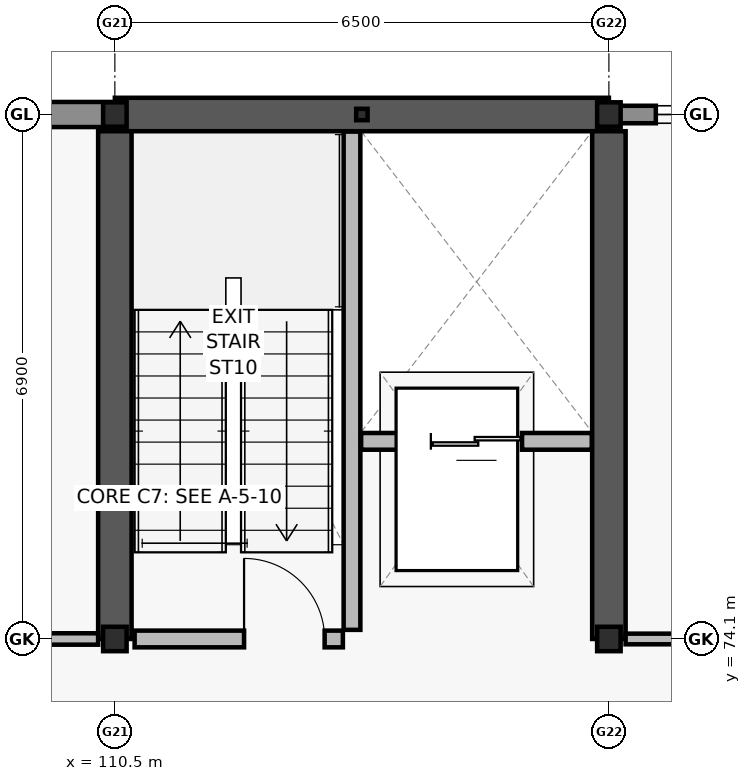
"""IFC4 building model, lengths in metres.
Left out: names, types, materials, properties, quantities, classifications, styles, units other than length and angle.
Written with IfcOpenShell. Run it as: python <this file> out.ifc"""

import sys

from ifc_helpers import new_model, si_unit, direction, frame, frame_2d, origin, origin_2d, place, context, subcontext, project, spatial, rectangle, hollow_rectangle, i_section, extrude, element, fill, save


model = new_model("IFC4")
c1 = context("Model", 3, precision=1e-05, world=origin(), true_north=direction((0.0, 1.0)))
c2 = subcontext(c1, "Body", "Model", "MODEL_VIEW")
j1 = project(units=[si_unit("LENGTHUNIT", "METRE"), si_unit("PLANEANGLEUNIT", "RADIAN")], contexts=[c1])
p1 = place(None, origin())
s1 = spatial("IfcSite", under=j1, at=p1, CompositionType="ELEMENT")
p2 = place(p1, origin())
s2 = spatial("IfcBuilding", under=s1, at=p2, CompositionType="ELEMENT")
p3 = place(p2, frame((0.0, 0.0, 5.4)))
s3 = spatial("IfcBuildingStorey", under=s2, at=p3, CompositionType="ELEMENT", Elevation=5.4)
for number, where, z_axis, x_axis in (
    (1, (110.5, 74.1, 0.0), (0.0, 0.0, 1.0), (1.0, 0.0, 0.0)),
    (2, (110.5, 81.0, 0.0), (0.0, 0.0, 1.0), (1.0, 0.0, 0.0)),
    (3, (117.0, 74.1, 0.0), (0.0, 0.0, 1.0), (1.0, 0.0, 0.0)),
    (4, (117.0, 81.0, 0.0), (0.0, 0.0, 1.0), (1.0, 0.0, 0.0)),
):
    element("IfcColumn", number, at=place(p3, frame(where, z_axis=z_axis, x_axis=x_axis)), inside=s3, PredefinedType="COLUMN", context=c2, shape_type="SweptSolid", body=[
        extrude(i_section(OverallWidth=0.309, OverallDepth=0.321, WebThickness=0.014, FlangeThickness=0.022, FilletRadius=0.017, at=origin_2d()), origin(), (0.0, 0.0, 1.0), 4.2),
    ])
p4 = place(p3, frame((113.75, 81.0, 0.0), z_axis=(0.0, 0.0, 1.0), x_axis=(1.0, 0.0, 0.0)))
e5 = element("IfcColumn", 5, at=p4, inside=s3, PredefinedType="PILASTER", context=c2, shape_type="SweptSolid", body=[
    extrude(hollow_rectangle(XDim=0.15, YDim=0.15, WallThickness=0.009, at=origin_2d()), origin(), (0.0, 0.0, 1.0), 4.2),
])
p5 = place(p3, frame((110.5, 81.0, 0.0), z_axis=(0.0, 0.0, 1.0), x_axis=(1.0, 0.0, 0.0)))
e6 = element("IfcWall", 6, at=p5, inside=s3, PredefinedType="SHEAR", context=c2, shape_type="SweptSolid", body=[
    extrude(rectangle(XDim=6.5, YDim=0.44, at=frame_2d((3.25, 0.0))), origin(), (0.0, 0.0, 1.0), 3.96),
])
for number, where, z_axis, x_axis in (
    (7, (110.5, 74.1, 0.0), (0.0, 0.0, 1.0), (0.0, 1.0, 0.0)),
    (8, (117.0, 74.1, 0.0), (0.0, 0.0, 1.0), (0.0, 1.0, 0.0)),
):
    element("IfcWall", number, at=place(p3, frame(where, z_axis=z_axis, x_axis=x_axis)), inside=s3, PredefinedType="SHEAR", context=c2, shape_type="SweptSolid", body=[
        extrude(rectangle(XDim=6.68, YDim=0.44, at=frame_2d((3.34, 0.0))), origin(), (0.0, 0.0, 1.0), 3.96),
    ])
p6 = place(p3, frame((104.005, 81.0, 0.0), z_axis=(0.0, 0.0, 1.0), x_axis=(1.0, 0.0, 0.0)))
e9 = element("IfcWall", 9, at=p6, inside=s3, PredefinedType="SOLIDWALL", context=c2, shape_type="SweptSolid", body=[
    extrude(rectangle(XDim=6.49, YDim=0.33, at=frame_2d((3.245, 0.0))), origin(), (0.0, 0.0, 1.0), 3.32),
])
p7 = place(p6, frame((0.688, 0.0, 0.8)))
e10 = element("IfcOpeningElement", 10, at=p7, cuts=e9, PredefinedType="OPENING", context=c2, shape_type="SweptSolid", body=[
    extrude(rectangle(XDim=1.9, YDim=1.8, at=frame_2d((0.95, 0.9))), frame((0.0, 0.175, 0.0), z_axis=(0.0, -1.0, 0.0), x_axis=(1.0, 0.0, 0.0)), (0.0, 0.0, 1.0), 0.35),
])
p8 = place(p3, frame((117.005, 81.0, 0.0), z_axis=(0.0, 0.0, 1.0), x_axis=(1.0, 0.0, 0.0)))
e11 = element("IfcWall", 11, at=p8, inside=s3, PredefinedType="SOLIDWALL", context=c2, shape_type="SweptSolid", body=[
    extrude(rectangle(XDim=6.49, YDim=0.23, at=frame_2d((3.245, 0.0))), origin(), (0.0, 0.0, 1.0), 3.32),
])
p9 = place(p8, frame((0.613, 0.0, 0.8)))
e12 = element("IfcOpeningElement", 12, at=p9, cuts=e11, PredefinedType="OPENING", context=c2, shape_type="SweptSolid", body=[
    extrude(rectangle(XDim=2.05, YDim=1.8, at=frame_2d((1.025, 0.9))), frame((0.0, 0.125, 0.0), z_axis=(0.0, -1.0, 0.0), x_axis=(1.0, 0.0, 0.0)), (0.0, 0.0, 1.0), 0.25),
])
p10 = place(p3, frame((113.62, 74.22, 0.0), z_axis=(0.0, 0.0, 1.0), x_axis=(0.0, 1.0, 0.0)))
e13 = element("IfcWall", 13, at=p10, inside=s3, PredefinedType="SOLIDWALL", context=c2, shape_type="SweptSolid", body=[
    extrude(rectangle(XDim=6.555, YDim=0.22, at=frame_2d((3.277, 0.0))), origin(), (0.0, 0.0, 1.0), 3.96),
])
p11 = place(p3, frame((110.76, 74.1, 0.0), z_axis=(0.0, 0.0, 1.0), x_axis=(1.0, 0.0, 0.0)))
e14 = element("IfcWall", 14, at=p11, inside=s3, PredefinedType="SOLIDWALL", context=c2, shape_type="SweptSolid", body=[
    extrude(rectangle(XDim=2.74, YDim=0.22, at=frame_2d((1.37, 0.0))), origin(), (0.0, 0.0, 1.0), 3.32),
])
p12 = place(p11, frame((1.44, 0.0, 0.0)))
e15 = element("IfcOpeningElement", 15, at=p12, cuts=e14, PredefinedType="OPENING", context=c2, shape_type="SweptSolid", body=[
    extrude(rectangle(XDim=1.06, YDim=2.1, at=frame_2d((0.53, 1.05))), frame((0.0, 0.12, 0.0), z_axis=(0.0, -1.0, 0.0), x_axis=(1.0, 0.0, 0.0)), (0.0, 0.0, 1.0), 0.24),
])
p13 = place(p3, frame((113.74, 76.7, 0.0), z_axis=(0.0, 0.0, 1.0), x_axis=(1.0, 0.0, 0.0)))
e16 = element("IfcWall", 16, at=p13, inside=s3, PredefinedType="SOLIDWALL", context=c2, shape_type="SweptSolid", body=[
    extrude(rectangle(XDim=3.035, YDim=0.22, at=frame_2d((1.518, 0.0))), origin(), (0.0, 0.0, 1.0), 3.96),
])
p14 = place(p13, frame((0.917, 0.0, 0.0)))
e17 = element("IfcOpeningElement", 17, at=p14, cuts=e16, PredefinedType="OPENING", context=c2, shape_type="SweptSolid", body=[
    extrude(rectangle(XDim=1.2, YDim=2.15, at=frame_2d((0.6, 1.075))), frame((0.0, 0.12, 0.0), z_axis=(0.0, -1.0, 0.0), x_axis=(1.0, 0.0, 0.0)), (0.0, 0.0, 1.0), 0.24),
])
p15 = place(p3, frame((104.22, 74.1, 0.0), z_axis=(0.0, 0.0, 1.0), x_axis=(1.0, 0.0, 0.0)))
e18 = element("IfcWall", 18, at=p15, inside=s3, PredefinedType="PARTITIONING", context=c2, shape_type="SweptSolid", body=[
    extrude(rectangle(XDim=6.06, YDim=0.15, at=frame_2d((3.03, 0.0))), origin(), (0.0, 0.0, 1.0), 3.3),
])
p16 = place(p15, frame((2.575, 0.0, 0.0)))
e19 = element("IfcOpeningElement", 19, at=p16, cuts=e18, PredefinedType="OPENING", context=c2, shape_type="SweptSolid", body=[
    extrude(rectangle(XDim=0.91, YDim=2.06, at=frame_2d((0.455, 1.03))), frame((0.0, 0.085, 0.0), z_axis=(0.0, -1.0, 0.0), x_axis=(1.0, 0.0, 0.0)), (0.0, 0.0, 1.0), 0.17),
])
p17 = place(p3, frame((117.22, 74.1, 0.0), z_axis=(0.0, 0.0, 1.0), x_axis=(1.0, 0.0, 0.0)))
e20 = element("IfcWall", 20, at=p17, inside=s3, PredefinedType="PARTITIONING", context=c2, shape_type="SweptSolid", body=[
    extrude(rectangle(XDim=12.56, YDim=0.14, at=frame_2d((6.28, 0.0))), origin(), (0.0, 0.0, 1.0), 3.3),
])
p18 = place(p17, frame((6.56, 0.0, 0.0)))
e21 = element("IfcOpeningElement", 21, at=p18, cuts=e20, PredefinedType="OPENING", context=c2, shape_type="SweptSolid", body=[
    extrude(rectangle(XDim=0.94, YDim=2.08, at=frame_2d((0.47, 1.04))), frame((0.0, 0.08, 0.0), z_axis=(0.0, -1.0, 0.0), x_axis=(1.0, 0.0, 0.0)), (0.0, 0.0, 1.0), 0.16),
])
p19 = place(p9, origin())
e22 = element("IfcWindow", 22, at=p19, inside=s3, PartitioningType="DOUBLE_PANEL_VERTICAL", PredefinedType="WINDOW", context=c2, shape_type="SweptSolid", body=[
    extrude(rectangle(XDim=2.05, YDim=1.8, at=frame_2d((1.025, 0.9))), frame((0.0, 0.03, 0.0), z_axis=(0.0, -1.0, 0.0), x_axis=(1.0, 0.0, 0.0)), (0.0, 0.0, 1.0), 0.06),
])
fill(e12, e22)
p20 = place(p12, origin())
e23 = element("IfcDoor", 23, at=p20, inside=s3, OperationType="SINGLE_SWING_LEFT", PredefinedType="DOOR", context=c2, shape_type="SweptSolid", body=[
    extrude(rectangle(XDim=1.06, YDim=2.1, at=frame_2d((0.53, 1.05))), frame((0.0, 0.025, 0.0), z_axis=(0.0, -1.0, 0.0), x_axis=(1.0, 0.0, 0.0)), (0.0, 0.0, 1.0), 0.05),
])
fill(e15, e23)
p21 = place(p14, origin())
e24 = element("IfcDoor", 24, at=p21, inside=s3, OperationType="DOUBLE_DOOR_SLIDING", PredefinedType="DOOR", context=c2, shape_type="SweptSolid", body=[
    extrude(rectangle(XDim=1.2, YDim=2.15, at=frame_2d((0.6, 1.075))), frame((0.0, 0.025, 0.0), z_axis=(0.0, -1.0, 0.0), x_axis=(1.0, 0.0, 0.0)), (0.0, 0.0, 1.0), 0.05),
])
fill(e17, e24)
save(model, sys.argv[1])
